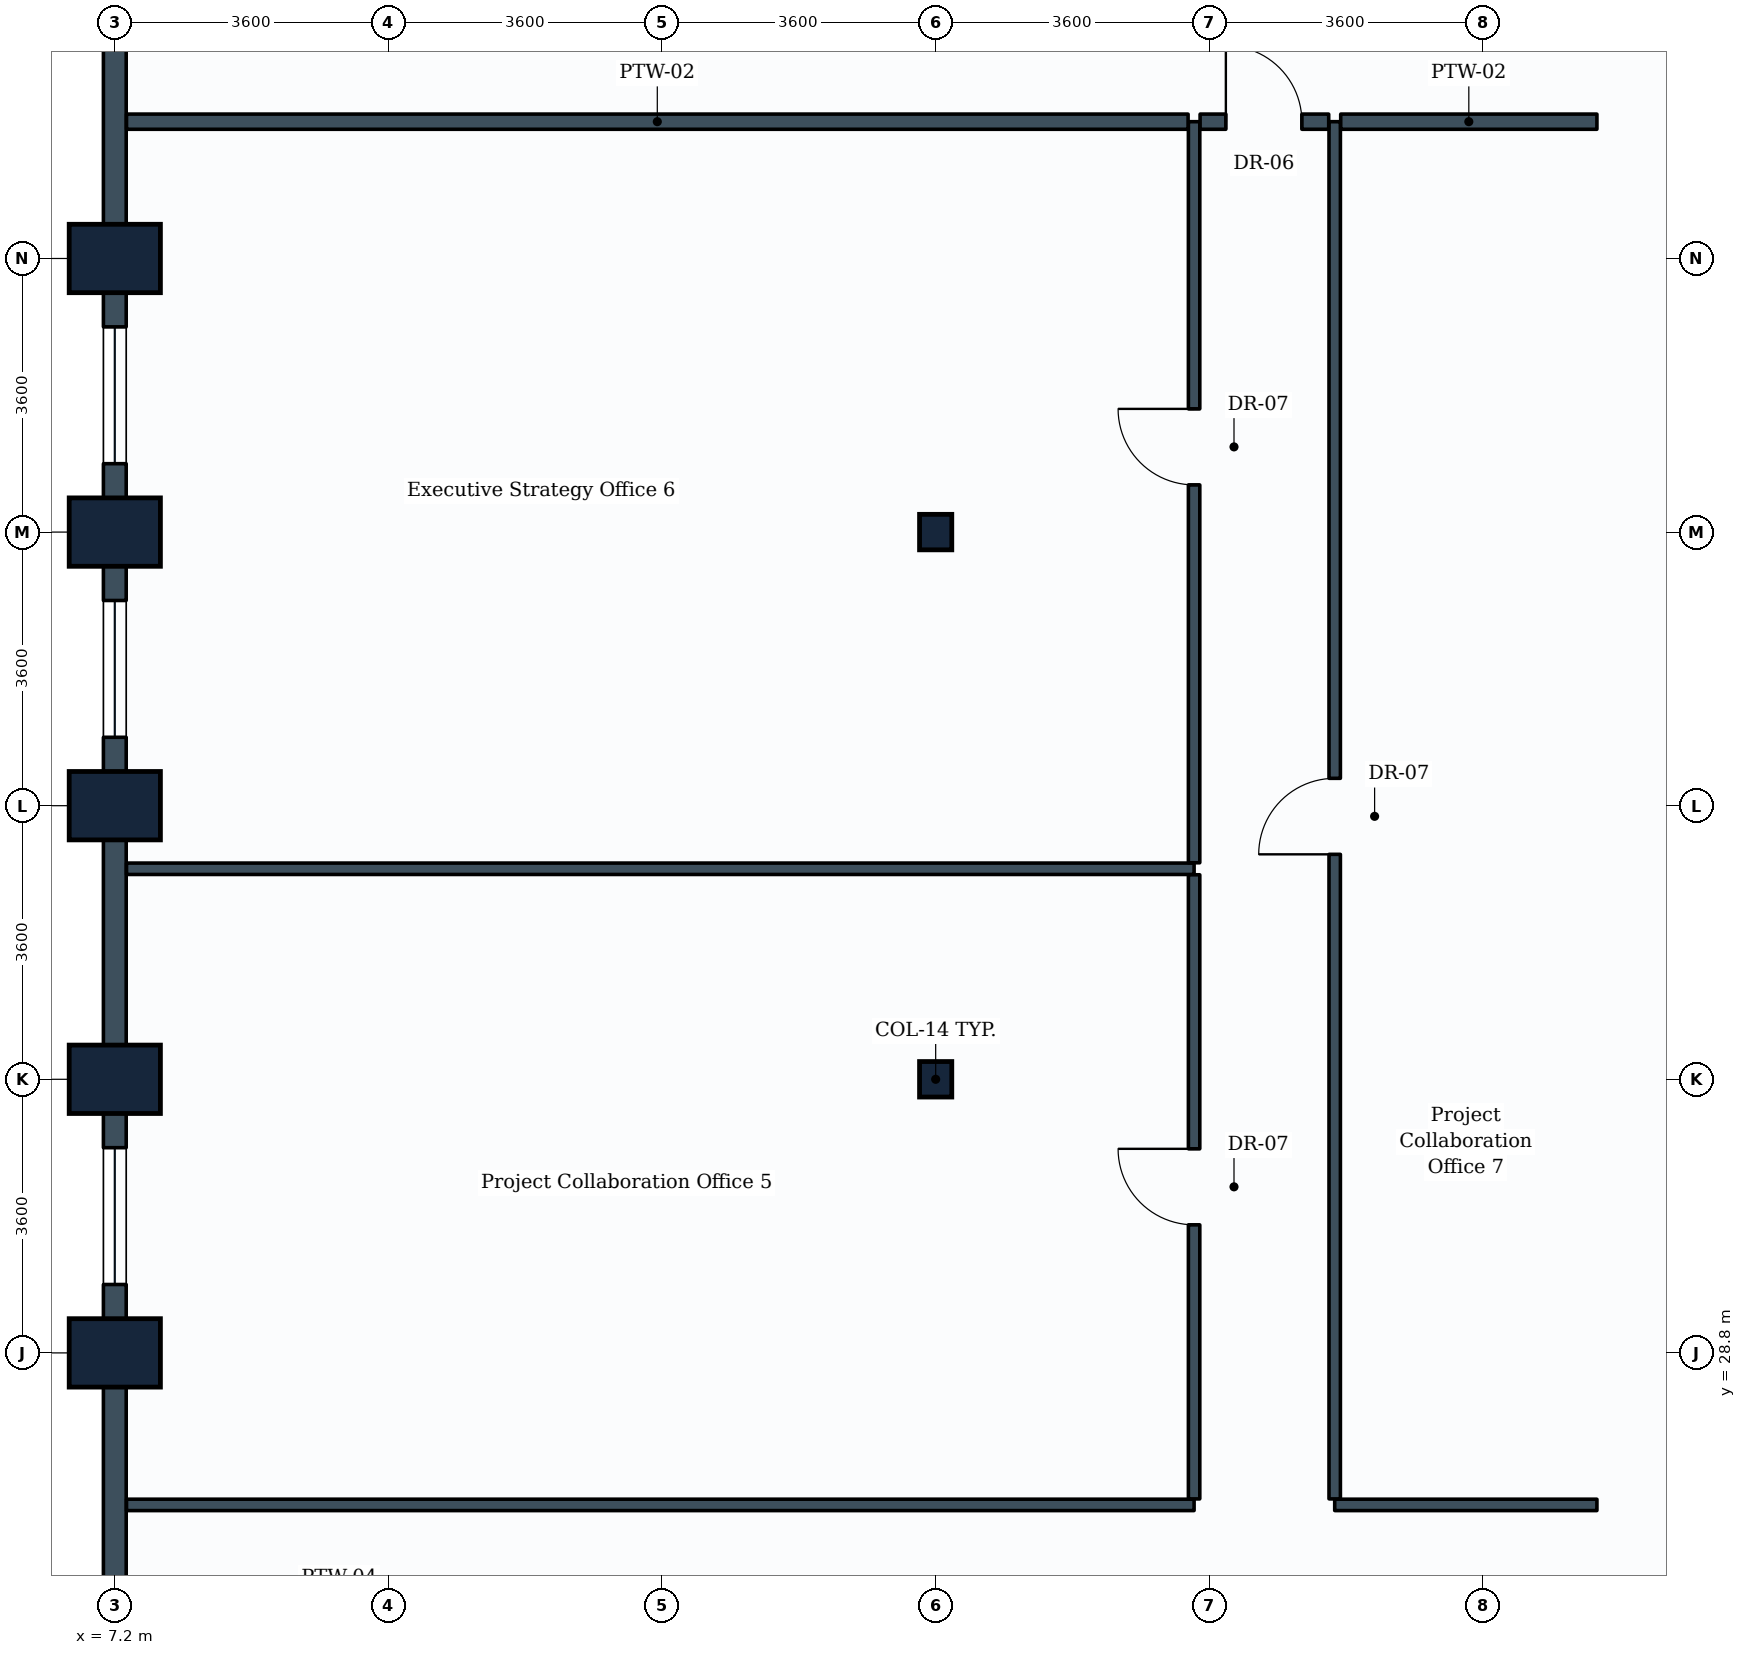
"""IFC4 building model, lengths in metres.
Left out: names, types, materials, properties, quantities, classifications, styles, units other than length and angle.
Written with IfcOpenShell. Run it as: python <this file> out.ifc"""

import sys

from ifc_helpers import new_model, si_unit, direction, frame, frame_2d, origin, origin_2d, place, context, subcontext, project, spatial, rectangle, i_section, extrude, element, fill, save


model = new_model("IFC4")
c1 = context("Model", 3, precision=1e-05, world=origin(), true_north=direction((0.0, 1.0)))
c2 = subcontext(c1, "Body", "Model", "MODEL_VIEW")
j1 = project(units=[si_unit("LENGTHUNIT", "METRE"), si_unit("PLANEANGLEUNIT", "RADIAN")], contexts=[c1])
p1 = place(None, origin())
s1 = spatial("IfcSite", under=j1, at=p1, CompositionType="ELEMENT")
p2 = place(p1, origin())
s2 = spatial("IfcBuilding", under=s1, at=p2, CompositionType="ELEMENT")
p3 = place(p2, frame((0.0, 0.0, 70.8)))
s3 = spatial("IfcBuildingStorey", under=s2, at=p3, CompositionType="ELEMENT", Elevation=70.8)
for number, where, z_axis, x_axis in (
    (1, (7.2, 28.8, 0.0), (0.0, 0.0, 1.0), (0.0, 1.0, 0.0)),
    (2, (7.2, 32.4, 0.0), (0.0, 0.0, 1.0), (0.0, 1.0, 0.0)),
    (3, (7.2, 36.0, 0.0), (0.0, 0.0, 1.0), (0.0, 1.0, 0.0)),
    (4, (7.2, 39.6, 0.0), (0.0, 0.0, 1.0), (0.0, 1.0, 0.0)),
    (5, (7.2, 43.2, 0.0), (0.0, 0.0, 1.0), (0.0, 1.0, 0.0)),
):
    element("IfcColumn", number, at=place(p3, frame(where, z_axis=z_axis, x_axis=x_axis)), inside=s3, PredefinedType="COLUMN", context=c2, shape_type="SweptSolid", body=[
        extrude(rectangle(XDim=0.9, YDim=1.2, at=origin_2d()), origin(), (0.0, 0.0, 1.0), 3.9),
    ])
for number, where, z_axis, x_axis in (
    (6, (18.0, 32.4, 0.0), (0.0, 0.0, 1.0), (1.0, 0.0, 0.0)),
    (7, (18.0, 39.6, 0.0), (0.0, 0.0, 1.0), (1.0, 0.0, 0.0)),
):
    element("IfcColumn", number, at=place(p3, frame(where, z_axis=z_axis, x_axis=x_axis)), inside=s3, PredefinedType="COLUMN", context=c2, shape_type="SweptSolid", body=[
        extrude(i_section(OverallWidth=0.424, OverallDepth=0.467, WebThickness=0.033, FlangeThickness=0.053, FilletRadius=0.015, at=origin_2d()), origin(), (0.0, 0.0, 1.0), 3.9),
    ])
p4 = place(p3, frame((7.2, 43.2, 0.0), z_axis=(0.0, 0.0, 1.0), x_axis=(0.0, 1.0, 0.0)))
e8 = element("IfcWall", 8, at=p4, inside=s3, PredefinedType="STANDARD", context=c2, shape_type="SweptSolid", body=[
    extrude(rectangle(XDim=3.6, YDim=0.3, at=frame_2d((1.8, 0.0))), origin(), (0.0, 0.0, 1.0), 2.93),
])
p5 = place(p3, frame((7.2, 39.6, 0.0), z_axis=(0.0, 0.0, 1.0), x_axis=(0.0, 1.0, 0.0)))
e9 = element("IfcWall", 9, at=p5, inside=s3, PredefinedType="STANDARD", context=c2, shape_type="SweptSolid", body=[
    extrude(rectangle(XDim=3.6, YDim=0.3, at=frame_2d((1.8, 0.0))), origin(), (0.0, 0.0, 1.0), 2.93),
])
p6 = place(p5, frame((0.9, 0.0, 0.85)))
e10 = element("IfcOpeningElement", 10, at=p6, cuts=e9, PredefinedType="OPENING", context=c2, shape_type="SweptSolid", body=[
    extrude(rectangle(XDim=1.8, YDim=1.35, at=frame_2d((0.9, 0.675))), frame((0.0, 0.16, 0.0), z_axis=(0.0, -1.0, 0.0), x_axis=(1.0, 0.0, 0.0)), (0.0, 0.0, 1.0), 0.32),
])
p7 = place(p3, frame((7.2, 36.0, 0.0), z_axis=(0.0, 0.0, 1.0), x_axis=(0.0, 1.0, 0.0)))
e11 = element("IfcWall", 11, at=p7, inside=s3, PredefinedType="STANDARD", context=c2, shape_type="SweptSolid", body=[
    extrude(rectangle(XDim=3.6, YDim=0.3, at=frame_2d((1.8, 0.0))), origin(), (0.0, 0.0, 1.0), 2.93),
])
p8 = place(p7, frame((0.9, 0.0, 0.85)))
e12 = element("IfcOpeningElement", 12, at=p8, cuts=e11, PredefinedType="OPENING", context=c2, shape_type="SweptSolid", body=[
    extrude(rectangle(XDim=1.8, YDim=1.35, at=frame_2d((0.9, 0.675))), frame((0.0, 0.16, 0.0), z_axis=(0.0, -1.0, 0.0), x_axis=(1.0, 0.0, 0.0)), (0.0, 0.0, 1.0), 0.32),
])
p9 = place(p3, frame((7.2, 32.4, 0.0), z_axis=(0.0, 0.0, 1.0), x_axis=(0.0, 1.0, 0.0)))
e13 = element("IfcWall", 13, at=p9, inside=s3, PredefinedType="STANDARD", context=c2, shape_type="SweptSolid", body=[
    extrude(rectangle(XDim=3.6, YDim=0.3, at=frame_2d((1.8, 0.0))), origin(), (0.0, 0.0, 1.0), 2.93),
])
p10 = place(p3, frame((7.2, 28.8, 0.0), z_axis=(0.0, 0.0, 1.0), x_axis=(0.0, 1.0, 0.0)))
e14 = element("IfcWall", 14, at=p10, inside=s3, PredefinedType="STANDARD", context=c2, shape_type="SweptSolid", body=[
    extrude(rectangle(XDim=3.6, YDim=0.3, at=frame_2d((1.8, 0.0))), origin(), (0.0, 0.0, 1.0), 2.93),
])
p11 = place(p10, frame((0.9, 0.0, 0.85)))
e15 = element("IfcOpeningElement", 15, at=p11, cuts=e14, PredefinedType="OPENING", context=c2, shape_type="SweptSolid", body=[
    extrude(rectangle(XDim=1.8, YDim=1.35, at=frame_2d((0.9, 0.675))), frame((0.0, 0.16, 0.0), z_axis=(0.0, -1.0, 0.0), x_axis=(1.0, 0.0, 0.0)), (0.0, 0.0, 1.0), 0.32),
])
p12 = place(p3, frame((7.2, 25.2, 0.0), z_axis=(0.0, 0.0, 1.0), x_axis=(0.0, 1.0, 0.0)))
e16 = element("IfcWall", 16, at=p12, inside=s3, PredefinedType="STANDARD", context=c2, shape_type="SweptSolid", body=[
    extrude(rectangle(XDim=3.6, YDim=0.3, at=frame_2d((1.8, 0.0))), origin(), (0.0, 0.0, 1.0), 2.93),
])
for number, where, z_axis, x_axis in (
    (17, (7.354, 26.8, 0.0), (0.0, 0.0, 1.0), (1.0, 0.0, 0.0)),
    (18, (7.354, 35.17, 0.0), (0.0, 0.0, 1.0), (1.0, 0.0, 0.0)),
):
    element("IfcWall", number, at=place(p3, frame(where, z_axis=z_axis, x_axis=x_axis)), inside=s3, PredefinedType="PARTITIONING", context=c2, shape_type="SweptSolid", body=[
        extrude(rectangle(XDim=14.046, YDim=0.15, at=frame_2d((7.023, 0.0))), origin(), (0.0, 0.0, 1.0), 2.93),
    ])
p13 = place(p3, frame((21.4, 26.879, 0.0), z_axis=(0.0, 0.0, 1.0), x_axis=(0.0, 1.0, 0.0)))
e19 = element("IfcWall", 19, at=p13, inside=s3, PredefinedType="PARTITIONING", context=c2, shape_type="SweptSolid", body=[
    extrude(rectangle(XDim=8.212, YDim=0.15, at=frame_2d((4.106, 0.0))), origin(), (0.0, 0.0, 1.0), 3.01),
])
p14 = place(p13, frame((3.606, 0.0, 0.0)))
e20 = element("IfcOpeningElement", 20, at=p14, cuts=e19, PredefinedType="OPENING", context=c2, shape_type="SweptSolid", body=[
    extrude(rectangle(XDim=1.0, YDim=2.1, at=frame_2d((0.5, 1.05))), frame((0.0, 0.085, 0.0), z_axis=(0.0, -1.0, 0.0), x_axis=(1.0, 0.0, 0.0)), (0.0, 0.0, 1.0), 0.17),
])
p15 = place(p3, frame((21.4, 35.249, 0.0), z_axis=(0.0, 0.0, 1.0), x_axis=(0.0, 1.0, 0.0)))
e21 = element("IfcWall", 21, at=p15, inside=s3, PredefinedType="PARTITIONING", context=c2, shape_type="SweptSolid", body=[
    extrude(rectangle(XDim=9.751, YDim=0.15, at=frame_2d((4.875, 0.0))), origin(), (0.0, 0.0, 1.0), 2.96),
])
p16 = place(p15, frame((4.972, 0.0, 0.0)))
e22 = element("IfcOpeningElement", 22, at=p16, cuts=e21, PredefinedType="OPENING", context=c2, shape_type="SweptSolid", body=[
    extrude(rectangle(XDim=1.0, YDim=2.1, at=frame_2d((0.5, 1.05))), frame((0.0, 0.085, 0.0), z_axis=(0.0, -1.0, 0.0), x_axis=(1.0, 0.0, 0.0)), (0.0, 0.0, 1.0), 0.17),
])
p17 = place(p3, frame((23.25, 26.8, 0.0), z_axis=(0.0, 0.0, 1.0), x_axis=(1.0, 0.0, 0.0)))
e23 = element("IfcWall", 23, at=p17, inside=s3, PredefinedType="PARTITIONING", context=c2, shape_type="SweptSolid", body=[
    extrude(rectangle(XDim=3.45, YDim=0.15, at=frame_2d((1.725, 0.0))), origin(), (0.0, 0.0, 1.0), 3.565),
])
p18 = place(p3, frame((23.25, 26.879, 0.0), z_axis=(0.0, 0.0, 1.0), x_axis=(0.0, 1.0, 0.0)))
e24 = element("IfcWall", 24, at=p18, inside=s3, PredefinedType="PARTITIONING", context=c2, shape_type="SweptSolid", body=[
    extrude(rectangle(XDim=18.121, YDim=0.15, at=frame_2d((9.061, 0.0))), origin(), (0.0, 0.0, 1.0), 3.01),
])
p19 = place(p18, frame((8.481, 0.0, 0.0)))
e25 = element("IfcOpeningElement", 25, at=p19, cuts=e24, PredefinedType="OPENING", context=c2, shape_type="SweptSolid", body=[
    extrude(rectangle(XDim=1.0, YDim=2.1, at=frame_2d((0.5, 1.05))), frame((0.0, 0.085, 0.0), z_axis=(0.0, -1.0, 0.0), x_axis=(1.0, 0.0, 0.0)), (0.0, 0.0, 1.0), 0.17),
])
p20 = place(p3, frame((7.354, 45.0, 0.0), z_axis=(0.0, 0.0, 1.0), x_axis=(1.0, 0.0, 0.0)))
e26 = element("IfcWall", 26, at=p20, inside=s3, PredefinedType="PARTITIONING", context=c2, shape_type="SweptSolid", body=[
    extrude(rectangle(XDim=13.967, YDim=0.2, at=frame_2d((6.983, 0.0))), origin(), (0.0, 0.0, 1.0), 2.93),
])
p21 = place(p3, frame((23.329, 45.0, 0.0), z_axis=(0.0, 0.0, 1.0), x_axis=(1.0, 0.0, 0.0)))
e27 = element("IfcWall", 27, at=p21, inside=s3, PredefinedType="PARTITIONING", context=c2, shape_type="SweptSolid", body=[
    extrude(rectangle(XDim=3.371, YDim=0.2, at=frame_2d((1.686, 0.0))), origin(), (0.0, 0.0, 1.0), 3.565),
])
p22 = place(p3, frame((21.479, 45.0, 0.0), z_axis=(0.0, 0.0, 1.0), x_axis=(1.0, 0.0, 0.0)))
e28 = element("IfcWall", 28, at=p22, inside=s3, PredefinedType="PARTITIONING", context=c2, shape_type="SweptSolid", body=[
    extrude(rectangle(XDim=1.692, YDim=0.2, at=frame_2d((0.846, 0.0))), origin(), (0.0, 0.0, 1.0), 3.565),
])
p23 = place(p22, frame((0.339, 0.0, 0.0)))
e29 = element("IfcOpeningElement", 29, at=p23, cuts=e28, PredefinedType="OPENING", context=c2, shape_type="SweptSolid", body=[
    extrude(rectangle(XDim=1.0, YDim=2.1, at=frame_2d((0.5, 1.05))), frame((0.0, 0.11, 0.0), z_axis=(0.0, -1.0, 0.0), x_axis=(1.0, 0.0, 0.0)), (0.0, 0.0, 1.0), 0.22),
])
p24 = place(p6, origin())
e30 = element("IfcWindow", 30, at=p24, inside=s3, PartitioningType="SINGLE_PANEL", PredefinedType="WINDOW", context=c2, shape_type="SweptSolid", body=[
    extrude(rectangle(XDim=1.8, YDim=1.35, at=frame_2d((0.9, 0.675))), frame((0.0, 0.03, 0.0), z_axis=(0.0, -1.0, 0.0), x_axis=(1.0, 0.0, 0.0)), (0.0, 0.0, 1.0), 0.06),
])
fill(e10, e30)
p25 = place(p8, origin())
e31 = element("IfcWindow", 31, at=p25, inside=s3, PartitioningType="SINGLE_PANEL", PredefinedType="WINDOW", context=c2, shape_type="SweptSolid", body=[
    extrude(rectangle(XDim=1.8, YDim=1.35, at=frame_2d((0.9, 0.675))), frame((0.0, 0.03, 0.0), z_axis=(0.0, -1.0, 0.0), x_axis=(1.0, 0.0, 0.0)), (0.0, 0.0, 1.0), 0.06),
])
fill(e12, e31)
p26 = place(p11, origin())
e32 = element("IfcWindow", 32, at=p26, inside=s3, PartitioningType="SINGLE_PANEL", PredefinedType="WINDOW", context=c2, shape_type="SweptSolid", body=[
    extrude(rectangle(XDim=1.8, YDim=1.35, at=frame_2d((0.9, 0.675))), frame((0.0, 0.03, 0.0), z_axis=(0.0, -1.0, 0.0), x_axis=(1.0, 0.0, 0.0)), (0.0, 0.0, 1.0), 0.06),
])
fill(e15, e32)
p27 = place(p14, origin())
e33 = element("IfcDoor", 33, at=p27, inside=s3, OperationType="SINGLE_SWING_RIGHT", PredefinedType="DOOR", context=c2, shape_type="SweptSolid", body=[
    extrude(rectangle(XDim=1.0, YDim=2.1, at=frame_2d((0.5, 1.05))), frame((0.0, 0.025, 0.0), z_axis=(0.0, -1.0, 0.0), x_axis=(1.0, 0.0, 0.0)), (0.0, 0.0, 1.0), 0.05),
])
fill(e20, e33)
p28 = place(p16, origin())
e34 = element("IfcDoor", 34, at=p28, inside=s3, OperationType="SINGLE_SWING_RIGHT", PredefinedType="DOOR", context=c2, shape_type="SweptSolid", body=[
    extrude(rectangle(XDim=1.0, YDim=2.1, at=frame_2d((0.5, 1.05))), frame((0.0, 0.025, 0.0), z_axis=(0.0, -1.0, 0.0), x_axis=(1.0, 0.0, 0.0)), (0.0, 0.0, 1.0), 0.05),
])
fill(e22, e34)
p29 = place(p19, origin())
e35 = element("IfcDoor", 35, at=p29, inside=s3, OperationType="SINGLE_SWING_LEFT", PredefinedType="DOOR", context=c2, shape_type="SweptSolid", body=[
    extrude(rectangle(XDim=1.0, YDim=2.1, at=frame_2d((0.5, 1.05))), frame((0.0, 0.025, 0.0), z_axis=(0.0, -1.0, 0.0), x_axis=(1.0, 0.0, 0.0)), (0.0, 0.0, 1.0), 0.05),
])
fill(e25, e35)
p30 = place(p23, origin())
e36 = element("IfcDoor", 36, at=p30, inside=s3, OperationType="SINGLE_SWING_LEFT", PredefinedType="DOOR", context=c2, shape_type="SweptSolid", body=[
    extrude(rectangle(XDim=1.0, YDim=2.1, at=frame_2d((0.5, 1.05))), frame((0.0, 0.025, 0.0), z_axis=(0.0, -1.0, 0.0), x_axis=(1.0, 0.0, 0.0)), (0.0, 0.0, 1.0), 0.05),
])
fill(e29, e36)
save(model, sys.argv[1])
